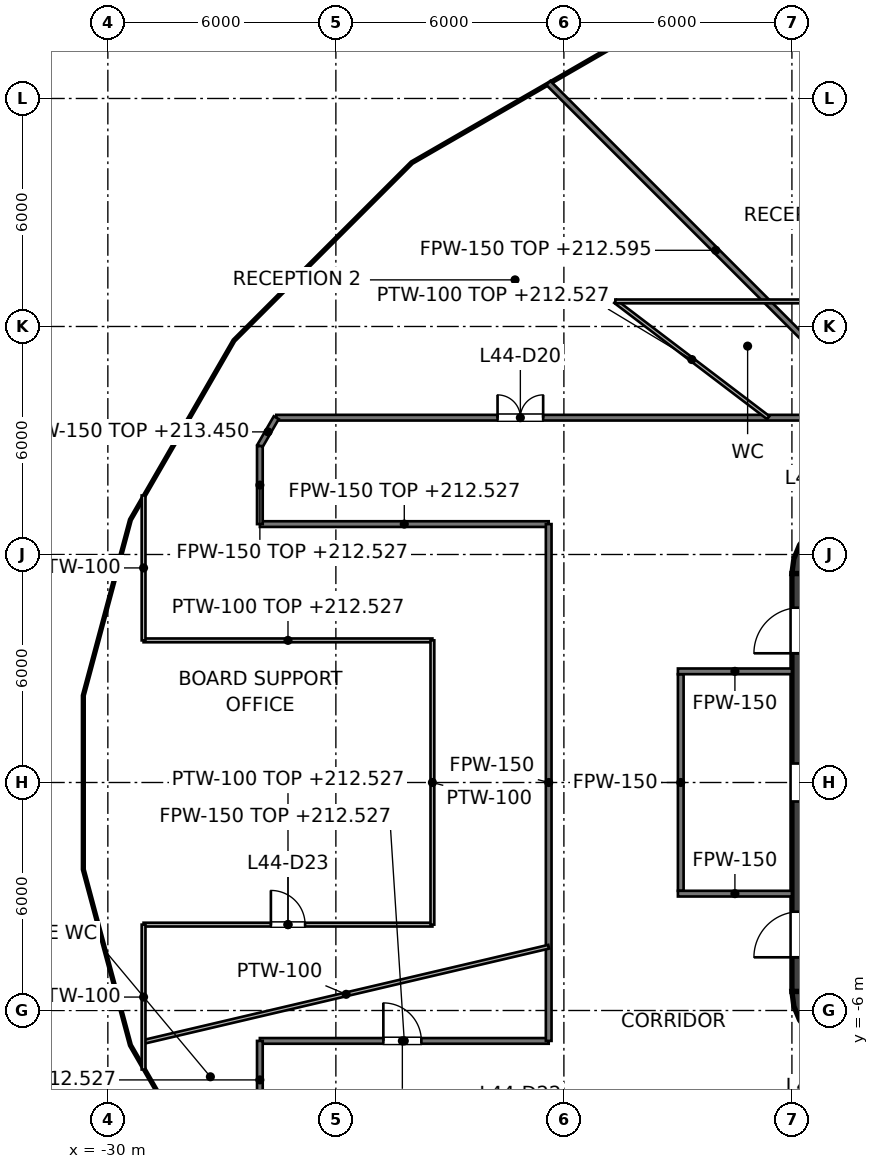
"""IFC4 building model, lengths in metres.
Left out: names, types, materials, properties, quantities, classifications, styles, units other than length and angle.
Written with IfcOpenShell. Run it as: python <this file> out.ifc"""

import sys

from ifc_helpers import new_model, si_unit, direction, frame, frame_2d, origin, place, context, subcontext, project, spatial, polyline, rectangle, outline, extrude, element, fill, save


model = new_model("IFC4")
c1 = context("Model", 3, precision=1e-05, world=origin(), true_north=direction((0.0, 1.0)))
c2 = subcontext(c1, "Body", "Model", "MODEL_VIEW")
j1 = project(units=[si_unit("LENGTHUNIT", "METRE"), si_unit("PLANEANGLEUNIT", "RADIAN")], contexts=[c1])
p1 = place(None, origin())
s1 = spatial("IfcSite", under=j1, at=p1, CompositionType="ELEMENT")
p2 = place(p1, origin())
s2 = spatial("IfcBuilding", under=s1, at=p2, CompositionType="ELEMENT")
p3 = place(p2, frame((0.0, 0.0, 209.6)))
s3 = spatial("IfcBuildingStorey", under=s2, at=p3, CompositionType="ELEMENT", Elevation=209.6)
p4 = place(p3, frame((-11.8, -5.5, 0.0), z_axis=(0.0, 0.0, 1.0), x_axis=(0.0, 1.0, 0.0)))
e1 = element("IfcWall", 1, at=p4, inside=s3, PredefinedType="SHEAR", context=c2, shape_type="SweptSolid", body=[
    extrude(rectangle(XDim=11.0, YDim=0.4, at=frame_2d((5.5, 0.0))), origin(), (0.0, 0.0, 1.0), 4.0),
])
p5 = place(p4, frame((5.0, 0.0, 0.0)))
e2 = element("IfcOpeningElement", 2, at=p5, cuts=e1, PredefinedType="OPENING", context=c2, shape_type="SweptSolid", body=[
    extrude(rectangle(XDim=1.0, YDim=2.1, at=frame_2d((0.5, 1.05))), frame((0.0, 0.2, 0.0), z_axis=(0.0, -1.0, 0.0), x_axis=(1.0, 0.0, 0.0)), (0.0, 0.0, 1.0), 0.4),
])
p6 = place(p4, frame((0.9, 0.0, 0.0)))
e3 = element("IfcOpeningElement", 3, at=p6, cuts=e1, PredefinedType="OPENING", context=c2, shape_type="SweptSolid", body=[
    extrude(rectangle(XDim=1.2, YDim=2.1, at=frame_2d((0.6, 1.05))), frame((0.0, 0.2, 0.0), z_axis=(0.0, -1.0, 0.0), x_axis=(1.0, 0.0, 0.0)), (0.0, 0.0, 1.0), 0.4),
])
p7 = place(p4, frame((8.9, 0.0, 0.0)))
e4 = element("IfcOpeningElement", 4, at=p7, cuts=e1, PredefinedType="OPENING", context=c2, shape_type="SweptSolid", body=[
    extrude(rectangle(XDim=1.2, YDim=2.1, at=frame_2d((0.6, 1.05))), frame((0.0, 0.2, 0.0), z_axis=(0.0, -1.0, 0.0), x_axis=(1.0, 0.0, 0.0)), (0.0, 0.0, 1.0), 0.4),
])
p8 = place(p3, origin())
e5 = element("IfcWall", 5, at=p8, inside=s3, PredefinedType="SHEAR", context=c2, shape_type="SweptSolid", body=[
    extrude(outline(polyline([(-12.0, 5.5), (-11.596, 5.5), (-11.559, 5.784), (-11.45, 6.048), (-11.275, 6.275), (-11.048, 6.45), (-10.784, 6.559), (-10.5, 6.596), (-10.5, 7.0), (-10.888, 6.949), (-11.25, 6.799), (-11.561, 6.561), (-11.799, 6.25), (-11.949, 5.888), (-12.0, 5.5)])), origin(), (0.0, 0.0, 1.0), 4.0),
])
e6 = element("IfcWall", 6, at=p8, inside=s3, PredefinedType="SHEAR", context=c2, shape_type="SweptSolid", body=[
    extrude(outline(polyline([(-10.5, -7.0), (-10.5, -6.596), (-10.784, -6.559), (-11.048, -6.45), (-11.275, -6.275), (-11.45, -6.048), (-11.559, -5.784), (-11.596, -5.5), (-12.0, -5.5), (-11.949, -5.888), (-11.799, -6.25), (-11.561, -6.561), (-11.25, -6.799), (-10.888, -6.949), (-10.5, -7.0)])), origin(), (0.0, 0.0, 1.0), 4.0),
])
p9 = place(p3, frame((-14.925, -2.85, 0.0), z_axis=(0.0, 0.0, 1.0), x_axis=(0.0, 1.0, 0.0)))
e7 = element("IfcWall", 7, at=p9, inside=s3, PredefinedType="PARTITIONING", context=c2, shape_type="SweptSolid", body=[
    extrude(rectangle(XDim=5.7, YDim=0.15, at=frame_2d((2.85, 0.0))), origin(), (0.0, 0.0, 1.0), 2.918),
])
for number, where, z_axis, x_axis in (
    (8, (-15.0, 2.925, 0.0), (0.0, 0.0, 1.0), (1.0, 0.0, 0.0)),
    (9, (-15.0, -2.925, 0.0), (0.0, 0.0, 1.0), (1.0, 0.0, 0.0)),
):
    element("IfcWall", number, at=place(p3, frame(where, z_axis=z_axis, x_axis=x_axis)), inside=s3, PredefinedType="PARTITIONING", context=c2, shape_type="SweptSolid", body=[
        extrude(rectangle(XDim=3.0, YDim=0.15, at=frame_2d((1.5, 0.0))), origin(), (0.0, 0.0, 1.0), 2.918),
    ])
p10 = place(p3, frame((-18.409, 18.409, 0.0), z_axis=(0.0, 0.0, 1.0), x_axis=(0.707106781187, -0.707106781187, 0.0)))
e10 = element("IfcWall", 10, at=p10, inside=s3, PredefinedType="PARTITIONING", context=c2, shape_type="SweptSolid", body=[
    extrude(rectangle(XDim=12.458, YDim=0.15, at=frame_2d((6.229, 0.0))), origin(), (0.0, 0.0, 1.0), 2.995),
])
p11 = place(p3, frame((-26.0, -6.8, 0.0), z_axis=(0.0, 0.0, 1.0), x_axis=(1.0, 0.0, 0.0)))
e11 = element("IfcWall", 11, at=p11, inside=s3, PredefinedType="PARTITIONING", context=c2, shape_type="SweptSolid", body=[
    extrude(rectangle(XDim=7.6, YDim=0.15, at=frame_2d((3.8, 0.0))), origin(), (0.0, 0.0, 1.0), 2.927),
])
p12 = place(p11, frame((3.249, 0.0, 0.0)))
e12 = element("IfcOpeningElement", 12, at=p12, cuts=e11, PredefinedType="OPENING", context=c2, shape_type="SweptSolid", body=[
    extrude(rectangle(XDim=1.0, YDim=2.1, at=frame_2d((0.5, 1.05))), frame((0.0, 0.075, 0.0), z_axis=(0.0, -1.0, 0.0), x_axis=(1.0, 0.0, 0.0)), (0.0, 0.0, 1.0), 0.15),
])
p13 = place(p3, frame((-26.0, 6.8, 0.0), z_axis=(0.0, 0.0, 1.0), x_axis=(1.0, 0.0, 0.0)))
e13 = element("IfcWall", 13, at=p13, inside=s3, PredefinedType="PARTITIONING", context=c2, shape_type="SweptSolid", body=[
    extrude(rectangle(XDim=7.6, YDim=0.15, at=frame_2d((3.8, 0.0))), origin(), (0.0, 0.0, 1.0), 2.927),
])
p14 = place(p3, frame((-25.569, 9.6, 0.0), z_axis=(0.0, 0.0, 1.0), x_axis=(1.0, 0.0, 0.0)))
e14 = element("IfcWall", 14, at=p14, inside=s3, PredefinedType="PARTITIONING", context=c2, shape_type="SweptSolid", body=[
    extrude(rectangle(XDim=51.138, YDim=0.15, at=frame_2d((25.569, 0.0))), origin(), (0.0, 0.0, 1.0), 2.918),
])
p15 = place(p14, frame((28.563, 0.0, 0.0)))
e15 = element("IfcOpeningElement", 15, at=p15, cuts=e14, PredefinedType="OPENING", context=c2, shape_type="SweptSolid", body=[
    extrude(rectangle(XDim=1.0, YDim=2.1, at=frame_2d((0.5, 1.05))), frame((0.0, 0.075, 0.0), z_axis=(0.0, -1.0, 0.0), x_axis=(1.0, 0.0, 0.0)), (0.0, 0.0, 1.0), 0.15),
])
p16 = place(p14, frame((24.697, 0.0, 0.0)))
e16 = element("IfcOpeningElement", 16, at=p16, cuts=e14, PredefinedType="OPENING", context=c2, shape_type="SweptSolid", body=[
    extrude(rectangle(XDim=1.0, YDim=2.1, at=frame_2d((0.5, 1.05))), frame((0.0, 0.075, 0.0), z_axis=(0.0, -1.0, 0.0), x_axis=(1.0, 0.0, 0.0)), (0.0, 0.0, 1.0), 0.15),
])
p17 = place(p14, frame((19.174, 0.0, 0.0)))
e17 = element("IfcOpeningElement", 17, at=p17, cuts=e14, PredefinedType="OPENING", context=c2, shape_type="SweptSolid", body=[
    extrude(rectangle(XDim=1.0, YDim=2.1, at=frame_2d((0.5, 1.05))), frame((0.0, 0.075, 0.0), z_axis=(0.0, -1.0, 0.0), x_axis=(1.0, 0.0, 0.0)), (0.0, 0.0, 1.0), 0.15),
])
p18 = place(p14, frame((13.958, 0.0, 0.0)))
e18 = element("IfcOpeningElement", 18, at=p18, cuts=e14, PredefinedType="OPENING", context=c2, shape_type="SweptSolid", body=[
    extrude(rectangle(XDim=1.0, YDim=2.1, at=frame_2d((0.5, 1.05))), frame((0.0, 0.075, 0.0), z_axis=(0.0, -1.0, 0.0), x_axis=(1.0, 0.0, 0.0)), (0.0, 0.0, 1.0), 0.15),
])
p19 = place(p14, frame((5.823, 0.0, 0.0)))
e19 = element("IfcOpeningElement", 19, at=p19, cuts=e14, PredefinedType="OPENING", context=c2, shape_type="SweptSolid", body=[
    extrude(rectangle(XDim=1.2, YDim=2.1, at=frame_2d((0.6, 1.05))), frame((0.0, 0.075, 0.0), z_axis=(0.0, -1.0, 0.0), x_axis=(1.0, 0.0, 0.0)), (0.0, 0.0, 1.0), 0.15),
])
p20 = place(p14, frame((38.621, 0.0, 0.0)))
e20 = element("IfcOpeningElement", 20, at=p20, cuts=e14, PredefinedType="OPENING", context=c2, shape_type="SweptSolid", body=[
    extrude(rectangle(XDim=1.0, YDim=2.1, at=frame_2d((0.5, 1.05))), frame((0.0, 0.075, 0.0), z_axis=(0.0, -1.0, 0.0), x_axis=(1.0, 0.0, 0.0)), (0.0, 0.0, 1.0), 0.15),
])
p21 = place(p3, frame((-26.0, 8.853, 0.0), z_axis=(0.0, 0.0, 1.0), x_axis=(0.499975693202, 0.866039436866, 0.0)))
e21 = element("IfcWall", 21, at=p21, inside=s3, PredefinedType="PARTITIONING", context=c2, shape_type="SweptSolid", body=[
    extrude(rectangle(XDim=0.862, YDim=0.15, at=frame_2d((0.431, 0.0))), origin(), (0.0, 0.0, 1.0), 3.85),
])
p22 = place(p3, frame((-18.4, -6.8, 0.0), z_axis=(0.0, 0.0, 1.0), x_axis=(0.0, 1.0, 0.0)))
e22 = element("IfcWall", 22, at=p22, inside=s3, PredefinedType="PARTITIONING", context=c2, shape_type="SweptSolid", body=[
    extrude(rectangle(XDim=13.6, YDim=0.15, at=frame_2d((6.8, 0.0))), origin(), (0.0, 0.0, 1.0), 2.918),
])
for number, where, z_axis, x_axis in (
    (23, (-26.0, -8.853, 0.0), (0.0, 0.0, 1.0), (0.0, 1.0, 0.0)),
    (24, (-26.0, 6.8, 0.0), (0.0, 0.0, 1.0), (0.0, 1.0, 0.0)),
):
    element("IfcWall", number, at=place(p3, frame(where, z_axis=z_axis, x_axis=x_axis)), inside=s3, PredefinedType="PARTITIONING", context=c2, shape_type="SweptSolid", body=[
        extrude(rectangle(XDim=2.053, YDim=0.15, at=frame_2d((1.026, 0.0))), origin(), (0.0, 0.0, 1.0), 2.927),
    ])
p23 = place(p3, frame((-16.646, 12.66, 0.0), z_axis=(0.0, 0.0, 1.0), x_axis=(0.796006750332, -0.605287744322, 0.0)))
e25 = element("IfcWall", 25, at=p23, inside=s3, PredefinedType="PARTITIONING", context=c2, shape_type="SweptSolid", body=[
    extrude(rectangle(XDim=5.055, YDim=0.1, at=frame_2d((2.528, 0.0))), origin(), (0.0, 0.0, 1.0), 2.927),
])
p24 = place(p3, frame((-29.06, -3.74, 0.0), z_axis=(0.0, 0.0, 1.0), x_axis=(1.0, 0.0, 0.0)))
e26 = element("IfcWall", 26, at=p24, inside=s3, PredefinedType="PARTITIONING", context=c2, shape_type="SweptSolid", body=[
    extrude(rectangle(XDim=7.6, YDim=0.1, at=frame_2d((3.8, 0.0))), origin(), (0.0, 0.0, 1.0), 2.927),
])
p25 = place(p24, frame((3.35, 0.0, 0.0)))
e27 = element("IfcOpeningElement", 27, at=p25, cuts=e26, PredefinedType="OPENING", context=c2, shape_type="SweptSolid", body=[
    extrude(rectangle(XDim=0.9, YDim=2.1, at=frame_2d((0.45, 1.05))), frame((0.0, 0.05, 0.0), z_axis=(0.0, -1.0, 0.0), x_axis=(1.0, 0.0, 0.0)), (0.0, 0.0, 1.0), 0.1),
])
p26 = place(p3, frame((-29.06, 3.74, 0.0), z_axis=(0.0, 0.0, 1.0), x_axis=(1.0, 0.0, 0.0)))
e28 = element("IfcWall", 28, at=p26, inside=s3, PredefinedType="PARTITIONING", context=c2, shape_type="SweptSolid", body=[
    extrude(rectangle(XDim=7.6, YDim=0.1, at=frame_2d((3.8, 0.0))), origin(), (0.0, 0.0, 1.0), 2.927),
])
p27 = place(p3, frame((-16.646, 12.66, 0.0), z_axis=(0.0, 0.0, 1.0), x_axis=(1.0, 0.0, 0.0)))
e29 = element("IfcWall", 29, at=p27, inside=s3, PredefinedType="PARTITIONING", context=c2, shape_type="SweptSolid", body=[
    extrude(rectangle(XDim=42.327, YDim=0.1, at=frame_2d((21.164, 0.0))), origin(), (0.0, 0.0, 1.0), 2.918),
])
p28 = place(p27, frame((7.92, 0.0, 0.0)))
e30 = element("IfcOpeningElement", 30, at=p28, cuts=e29, PredefinedType="OPENING", context=c2, shape_type="SweptSolid", body=[
    extrude(rectangle(XDim=1.8, YDim=2.1, at=frame_2d((0.9, 1.05))), frame((0.0, 0.05, 0.0), z_axis=(0.0, -1.0, 0.0), x_axis=(1.0, 0.0, 0.0)), (0.0, 0.0, 1.0), 0.1),
])
p29 = place(p27, frame((32.691, 0.0, 0.0)))
e31 = element("IfcOpeningElement", 31, at=p29, cuts=e29, PredefinedType="OPENING", context=c2, shape_type="SweptSolid", body=[
    extrude(rectangle(XDim=0.9, YDim=2.1, at=frame_2d((0.45, 1.05))), frame((0.0, 0.05, 0.0), z_axis=(0.0, -1.0, 0.0), x_axis=(1.0, 0.0, 0.0)), (0.0, 0.0, 1.0), 0.1),
])
p30 = place(p3, frame((-29.06, -6.826, 0.0), z_axis=(0.0, 0.0, 1.0), x_axis=(0.973505984195, 0.228661537511, 0.0)))
e32 = element("IfcWall", 32, at=p30, inside=s3, PredefinedType="PARTITIONING", context=c2, shape_type="SweptSolid", body=[
    extrude(rectangle(XDim=10.95, YDim=0.1, at=frame_2d((5.475, 0.0))), origin(), (0.0, 0.0, 1.0), 2.918),
])
p31 = place(p3, frame((-21.46, -3.74, 0.0), z_axis=(0.0, 0.0, 1.0), x_axis=(0.0, 1.0, 0.0)))
e33 = element("IfcWall", 33, at=p31, inside=s3, PredefinedType="PARTITIONING", context=c2, shape_type="SweptSolid", body=[
    extrude(rectangle(XDim=7.48, YDim=0.1, at=frame_2d((3.74, 0.0))), origin(), (0.0, 0.0, 1.0), 2.918),
])
for number, where, z_axis, x_axis in (
    (34, (-29.06, -7.553, 0.0), (0.0, 0.0, 1.0), (0.0, 1.0, 0.0)),
    (35, (-29.06, 3.74, 0.0), (0.0, 0.0, 1.0), (0.0, 1.0, 0.0)),
):
    element("IfcWall", number, at=place(p3, frame(where, z_axis=z_axis, x_axis=x_axis)), inside=s3, PredefinedType="PARTITIONING", context=c2, shape_type="SweptSolid", body=[
        extrude(rectangle(XDim=3.813, YDim=0.1, at=frame_2d((1.906, 0.0))), origin(), (0.0, 0.0, 1.0), 2.918),
    ])
p32 = place(p5, origin())
e36 = element("IfcDoor", 36, at=p32, inside=s3, OperationType="SINGLE_SWING_RIGHT", PredefinedType="DOOR", context=c2, shape_type="SweptSolid", body=[
    extrude(rectangle(XDim=1.0, YDim=2.1, at=frame_2d((0.5, 1.05))), frame((0.0, 0.025, 0.0), z_axis=(0.0, -1.0, 0.0), x_axis=(1.0, 0.0, 0.0)), (0.0, 0.0, 1.0), 0.05),
])
fill(e2, e36)
p33 = place(p6, origin())
e37 = element("IfcDoor", 37, at=p33, inside=s3, OperationType="SINGLE_SWING_LEFT", PredefinedType="DOOR", context=c2, shape_type="SweptSolid", body=[
    extrude(rectangle(XDim=1.2, YDim=2.1, at=frame_2d((0.6, 1.05))), frame((0.0, 0.025, 0.0), z_axis=(0.0, -1.0, 0.0), x_axis=(1.0, 0.0, 0.0)), (0.0, 0.0, 1.0), 0.05),
])
fill(e3, e37)
p34 = place(p7, origin())
e38 = element("IfcDoor", 38, at=p34, inside=s3, OperationType="SINGLE_SWING_LEFT", PredefinedType="DOOR", context=c2, shape_type="SweptSolid", body=[
    extrude(rectangle(XDim=1.2, YDim=2.1, at=frame_2d((0.6, 1.05))), frame((0.0, 0.025, 0.0), z_axis=(0.0, -1.0, 0.0), x_axis=(1.0, 0.0, 0.0)), (0.0, 0.0, 1.0), 0.05),
])
fill(e4, e38)
p35 = place(p19, origin())
e39 = element("IfcDoor", 39, at=p35, inside=s3, OperationType="DOUBLE_DOOR_SINGLE_SWING", PredefinedType="DOOR", context=c2, shape_type="SweptSolid", body=[
    extrude(rectangle(XDim=1.2, YDim=2.1, at=frame_2d((0.6, 1.05))), frame((0.0, 0.025, 0.0), z_axis=(0.0, -1.0, 0.0), x_axis=(1.0, 0.0, 0.0)), (0.0, 0.0, 1.0), 0.05),
])
fill(e19, e39)
p36 = place(p12, origin())
e40 = element("IfcDoor", 40, at=p36, inside=s3, OperationType="SINGLE_SWING_LEFT", PredefinedType="DOOR", context=c2, shape_type="SweptSolid", body=[
    extrude(rectangle(XDim=1.0, YDim=2.1, at=frame_2d((0.5, 1.05))), frame((0.0, 0.025, 0.0), z_axis=(0.0, -1.0, 0.0), x_axis=(1.0, 0.0, 0.0)), (0.0, 0.0, 1.0), 0.05),
])
fill(e12, e40)
p37 = place(p25, origin())
e41 = element("IfcDoor", 41, at=p37, inside=s3, OperationType="SINGLE_SWING_LEFT", PredefinedType="DOOR", context=c2, shape_type="SweptSolid", body=[
    extrude(rectangle(XDim=0.9, YDim=2.1, at=frame_2d((0.45, 1.05))), frame((0.0, 0.025, 0.0), z_axis=(0.0, -1.0, 0.0), x_axis=(1.0, 0.0, 0.0)), (0.0, 0.0, 1.0), 0.05),
])
fill(e27, e41)
save(model, sys.argv[1])
